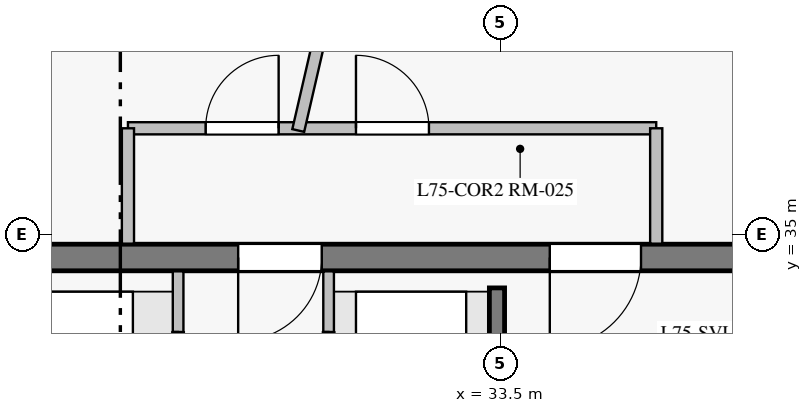
"""IFC4 building model, lengths in metres.
Left out: names, types, materials, properties, quantities, classifications, styles, units other than length and angle.
Written with IfcOpenShell. Run it as: python <this file> out.ifc"""

import sys

from ifc_helpers import new_model, si_unit, direction, frame, frame_2d, origin, origin_with_axes, place, context, subcontext, project, spatial, rectangle, extrude, source, transform, mapped, element, fill, save


model = new_model("IFC4")
c1 = context("Model", 3, precision=1e-05, world=origin(), true_north=direction((0.0, 1.0)))
c2 = subcontext(c1, "Body", "Model", "MODEL_VIEW")
j1 = project(units=[si_unit("LENGTHUNIT", "METRE"), si_unit("PLANEANGLEUNIT", "RADIAN")], contexts=[c1])
p1 = place(None, origin())
s1 = spatial("IfcSite", under=j1, at=p1, CompositionType="ELEMENT")
p2 = place(p1, origin())
s2 = spatial("IfcBuilding", under=s1, at=p2, CompositionType="ELEMENT")
p3 = place(p2, frame((0.0, 0.0, 253.5)))
s3 = spatial("IfcBuildingStorey", under=s2, at=p3, CompositionType="ELEMENT", Elevation=253.5)
p4 = place(p3, frame((37.5, 34.7, 0.0), z_axis=(0.0, 0.0, 1.0), x_axis=(-1.0, 0.0, 0.0)))
e1 = element("IfcWall", 1, at=p4, inside=s3, PredefinedType="SHEAR", context=c2, shape_type="SweptSolid", body=[
    extrude(rectangle(XDim=10.95, YDim=0.35, at=frame_2d((5.475, 0.0))), origin(), (0.0, 0.0, 1.0), 2.85),
])
p5 = place(p4, frame((2.15, 0.0, 0.0)))
e2 = element("IfcOpeningElement", 2, at=p5, cuts=e1, PredefinedType="OPENING", context=c2, shape_type="SweptSolid", body=[
    extrude(rectangle(XDim=1.2, YDim=2.15, at=frame_2d((0.6, 1.075))), frame((0.0, 0.185, 0.0), z_axis=(0.0, -1.0, 0.0), x_axis=(1.0, 0.0, 0.0)), (0.0, 0.0, 1.0), 0.37),
])
p6 = place(p4, frame((6.35, 0.0, 0.0)))
e3 = element("IfcOpeningElement", 3, at=p6, cuts=e1, PredefinedType="OPENING", context=c2, shape_type="SweptSolid", body=[
    extrude(rectangle(XDim=1.1, YDim=2.15, at=frame_2d((0.55, 1.075))), frame((0.0, 0.185, 0.0), z_axis=(0.0, -1.0, 0.0), x_axis=(1.0, 0.0, 0.0)), (0.0, 0.0, 1.0), 0.37),
])
p7 = place(p3, frame((33.455, 18.7, 0.0), z_axis=(0.0, 0.0, 1.0), x_axis=(0.0, 1.0, 0.0)))
e4 = element("IfcWall", 4, at=p7, inside=s3, PredefinedType="SHEAR", context=c2, shape_type="SweptSolid", body=[
    extrude(rectangle(XDim=15.6, YDim=0.2, at=frame_2d((7.8, 0.0))), origin(), (0.0, 0.0, 1.0), 2.85),
])
p8 = place(p7, frame((2.75, 0.0, 0.0)))
e5 = element("IfcOpeningElement", 5, at=p8, cuts=e4, PredefinedType="OPENING", context=c2, shape_type="SweptSolid", body=[
    extrude(rectangle(XDim=1.15, YDim=2.15, at=frame_2d((0.575, 1.075))), frame((0.0, 0.11, 0.0), z_axis=(0.0, -1.0, 0.0), x_axis=(1.0, 0.0, 0.0)), (0.0, 0.0, 1.0), 0.22),
])
p9 = place(p7, frame((0.55, 0.0, 0.0)))
e6 = element("IfcOpeningElement", 6, at=p9, cuts=e4, PredefinedType="OPENING", context=c2, shape_type="SweptSolid", body=[
    extrude(rectangle(XDim=0.94, YDim=2.1, at=frame_2d((0.47, 1.05))), frame((0.0, 0.11, 0.0), z_axis=(0.0, -1.0, 0.0), x_axis=(1.0, 0.0, 0.0)), (0.0, 0.0, 1.0), 0.22),
])
p10 = place(p3, frame((28.6, 36.4, 0.0), z_axis=(0.0, 0.0, 1.0), x_axis=(1.0, 0.0, 0.0)))
e7 = element("IfcWall", 7, at=p10, inside=s3, PredefinedType="PARTITIONING", context=c2, shape_type="SweptSolid", body=[
    extrude(rectangle(XDim=6.95, YDim=0.16, at=frame_2d((3.475, 0.0))), origin(), (0.0, 0.0, 1.0), 2.45),
])
p11 = place(p10, frame((3.0, 0.0, 0.0)))
e8 = element("IfcOpeningElement", 8, at=p11, cuts=e7, PredefinedType="OPENING", context=c2, shape_type="SweptSolid", body=[
    extrude(rectangle(XDim=0.96, YDim=2.15, at=frame_2d((0.48, 1.075))), frame((0.0, 0.09, 0.0), z_axis=(0.0, -1.0, 0.0), x_axis=(1.0, 0.0, 0.0)), (0.0, 0.0, 1.0), 0.18),
])
p12 = place(p10, frame((1.022, 0.0, 0.0)))
e9 = element("IfcOpeningElement", 9, at=p12, cuts=e7, PredefinedType="OPENING", context=c2, shape_type="SweptSolid", body=[
    extrude(rectangle(XDim=0.96, YDim=2.15, at=frame_2d((0.48, 1.075))), frame((0.0, 0.09, 0.0), z_axis=(0.0, -1.0, 0.0), x_axis=(1.0, 0.0, 0.0)), (0.0, 0.0, 1.0), 0.18),
])
p13 = place(p3, frame((30.84, 36.371, 0.0), z_axis=(0.0, 0.0, 1.0), x_axis=(0.224977855342, 0.974363876899, 0.0)))
e10 = element("IfcWall", 10, at=p13, inside=s3, PredefinedType="PARTITIONING", context=c2, shape_type="SweptSolid", body=[
    extrude(rectangle(XDim=5.424, YDim=0.16, at=frame_2d((2.712, 0.0))), origin(), (0.0, 0.0, 1.0), 2.85),
])
p14 = place(p3, frame((29.26, 30.45, 0.0), z_axis=(0.0, 0.0, 1.0), x_axis=(0.0, 1.0, 0.0)))
e11 = element("IfcWall", 11, at=p14, inside=s3, PredefinedType="PARTITIONING", context=c2, shape_type="SweptSolid", body=[
    extrude(rectangle(XDim=4.068, YDim=0.14, at=frame_2d((2.034, 0.0))), origin(), (0.0, 0.0, 1.0), 2.85),
])
p15 = place(p14, frame((0.35, 0.0, 0.0)))
e12 = element("IfcOpeningElement", 12, at=p15, cuts=e11, PredefinedType="OPENING", context=c2, shape_type="SweptSolid", body=[
    extrude(rectangle(XDim=1.02, YDim=2.15, at=frame_2d((0.51, 1.075))), frame((0.0, 0.08, 0.0), z_axis=(0.0, -1.0, 0.0), x_axis=(1.0, 0.0, 0.0)), (0.0, 0.0, 1.0), 0.16),
])
p16 = place(p14, frame((2.25, 0.0, 0.0)))
e13 = element("IfcOpeningElement", 13, at=p16, cuts=e11, PredefinedType="OPENING", context=c2, shape_type="SweptSolid", body=[
    extrude(rectangle(XDim=1.02, YDim=2.15, at=frame_2d((0.51, 1.075))), frame((0.0, 0.08, 0.0), z_axis=(0.0, -1.0, 0.0), x_axis=(1.0, 0.0, 0.0)), (0.0, 0.0, 1.0), 0.16),
])
p17 = place(p3, frame((31.24, 30.45, 0.0), z_axis=(0.0, 0.0, 1.0), x_axis=(0.0, 1.0, 0.0)))
e14 = element("IfcWall", 14, at=p17, inside=s3, PredefinedType="PARTITIONING", context=c2, shape_type="SweptSolid", body=[
    extrude(rectangle(XDim=4.068, YDim=0.14, at=frame_2d((2.034, 0.0))), origin(), (0.0, 0.0, 1.0), 2.85),
])
p18 = place(p17, frame((0.35, 0.0, 0.0)))
e15 = element("IfcOpeningElement", 15, at=p18, cuts=e14, PredefinedType="OPENING", context=c2, shape_type="SweptSolid", body=[
    extrude(rectangle(XDim=1.02, YDim=2.15, at=frame_2d((0.51, 1.075))), frame((0.0, 0.08, 0.0), z_axis=(0.0, -1.0, 0.0), x_axis=(1.0, 0.0, 0.0)), (0.0, 0.0, 1.0), 0.16),
])
p19 = place(p17, frame((2.25, 0.0, 0.0)))
e16 = element("IfcOpeningElement", 16, at=p19, cuts=e14, PredefinedType="OPENING", context=c2, shape_type="SweptSolid", body=[
    extrude(rectangle(XDim=1.02, YDim=2.15, at=frame_2d((0.51, 1.075))), frame((0.0, 0.08, 0.0), z_axis=(0.0, -1.0, 0.0), x_axis=(1.0, 0.0, 0.0)), (0.0, 0.0, 1.0), 0.16),
])
for number, where, z_axis, x_axis in (
    (17, (28.6, 34.882, 0.0), (0.0, 0.0, 1.0), (0.0, 1.0, 0.0)),
    (18, (35.55, 36.4, 0.0), (0.0, 0.0, 1.0), (0.0, -1.0, 0.0)),
):
    element("IfcWall", number, at=place(p3, frame(where, z_axis=z_axis, x_axis=x_axis)), inside=s3, PredefinedType="PARTITIONING", context=c2, shape_type="SweptSolid", body=[
        extrude(rectangle(XDim=1.518, YDim=0.16, at=frame_2d((0.759, 0.0))), origin(), (0.0, 0.0, 1.0), 2.85),
    ])
m1 = source(origin_with_axes(), c2, "Body", "SweptSolid", [
    extrude(rectangle(XDim=1.2, YDim=2.15, at=frame_2d((0.6, 1.075))), frame((0.0, 0.025, 0.0), z_axis=(0.0, -1.0, 0.0), x_axis=(1.0, 0.0, 0.0)), (0.0, 0.0, 1.0), 0.05),
])
p20 = place(p5, origin())
e19 = element("IfcDoor", 19, at=p20, inside=s3, OperationType="SINGLE_SWING_RIGHT", PredefinedType="DOOR", context=c2, shape_type="MappedRepresentation", body=[
    mapped(m1, transform((0.0, 0.0, 0.0), scale=1.0)),
])
fill(e2, e19)
m2 = source(origin_with_axes(), c2, "Body", "SweptSolid", [
    extrude(rectangle(XDim=1.1, YDim=2.15, at=frame_2d((0.55, 1.075))), frame((0.0, 0.025, 0.0), z_axis=(0.0, -1.0, 0.0), x_axis=(1.0, 0.0, 0.0)), (0.0, 0.0, 1.0), 0.05),
])
p21 = place(p6, origin())
e20 = element("IfcDoor", 20, at=p21, inside=s3, OperationType="SINGLE_SWING_RIGHT", PredefinedType="DOOR", context=c2, shape_type="MappedRepresentation", body=[
    mapped(m2, transform((0.0, 0.0, 0.0), scale=1.0)),
])
fill(e3, e20)
m3 = source(origin_with_axes(), c2, "Body", "SweptSolid", [
    extrude(rectangle(XDim=1.02, YDim=2.15, at=frame_2d((0.51, 1.075))), frame((0.0, 0.025, 0.0), z_axis=(0.0, -1.0, 0.0), x_axis=(1.0, 0.0, 0.0)), (0.0, 0.0, 1.0), 0.05),
])
p22 = place(p16, origin())
e21 = element("IfcDoor", 21, at=p22, inside=s3, OperationType="SLIDING_TO_LEFT", PredefinedType="DOOR", context=c2, shape_type="MappedRepresentation", body=[
    mapped(m3, transform((0.0, 0.0, 0.0), scale=1.0)),
])
fill(e13, e21)
p23 = place(p19, origin())
e22 = element("IfcDoor", 22, at=p23, inside=s3, OperationType="SLIDING_TO_LEFT", PredefinedType="DOOR", context=c2, shape_type="MappedRepresentation", body=[
    mapped(m3, transform((0.0, 0.0, 0.0), scale=1.0)),
])
fill(e16, e22)
m4 = source(origin_with_axes(), c2, "Body", "SweptSolid", [
    extrude(rectangle(XDim=0.96, YDim=2.15, at=frame_2d((0.48, 1.075))), frame((0.0, 0.025, 0.0), z_axis=(0.0, -1.0, 0.0), x_axis=(1.0, 0.0, 0.0)), (0.0, 0.0, 1.0), 0.05),
])
p24 = place(p11, origin())
e23 = element("IfcDoor", 23, at=p24, inside=s3, OperationType="SINGLE_SWING_LEFT", PredefinedType="DOOR", context=c2, shape_type="MappedRepresentation", body=[
    mapped(m4, transform((0.0, 0.0, 0.0), scale=1.0)),
])
fill(e8, e23)
p25 = place(p12, origin())
e24 = element("IfcDoor", 24, at=p25, inside=s3, OperationType="SINGLE_SWING_RIGHT", PredefinedType="DOOR", context=c2, shape_type="MappedRepresentation", body=[
    mapped(m4, transform((0.0, 0.0, 0.0), scale=1.0)),
])
fill(e9, e24)
save(model, sys.argv[1])
